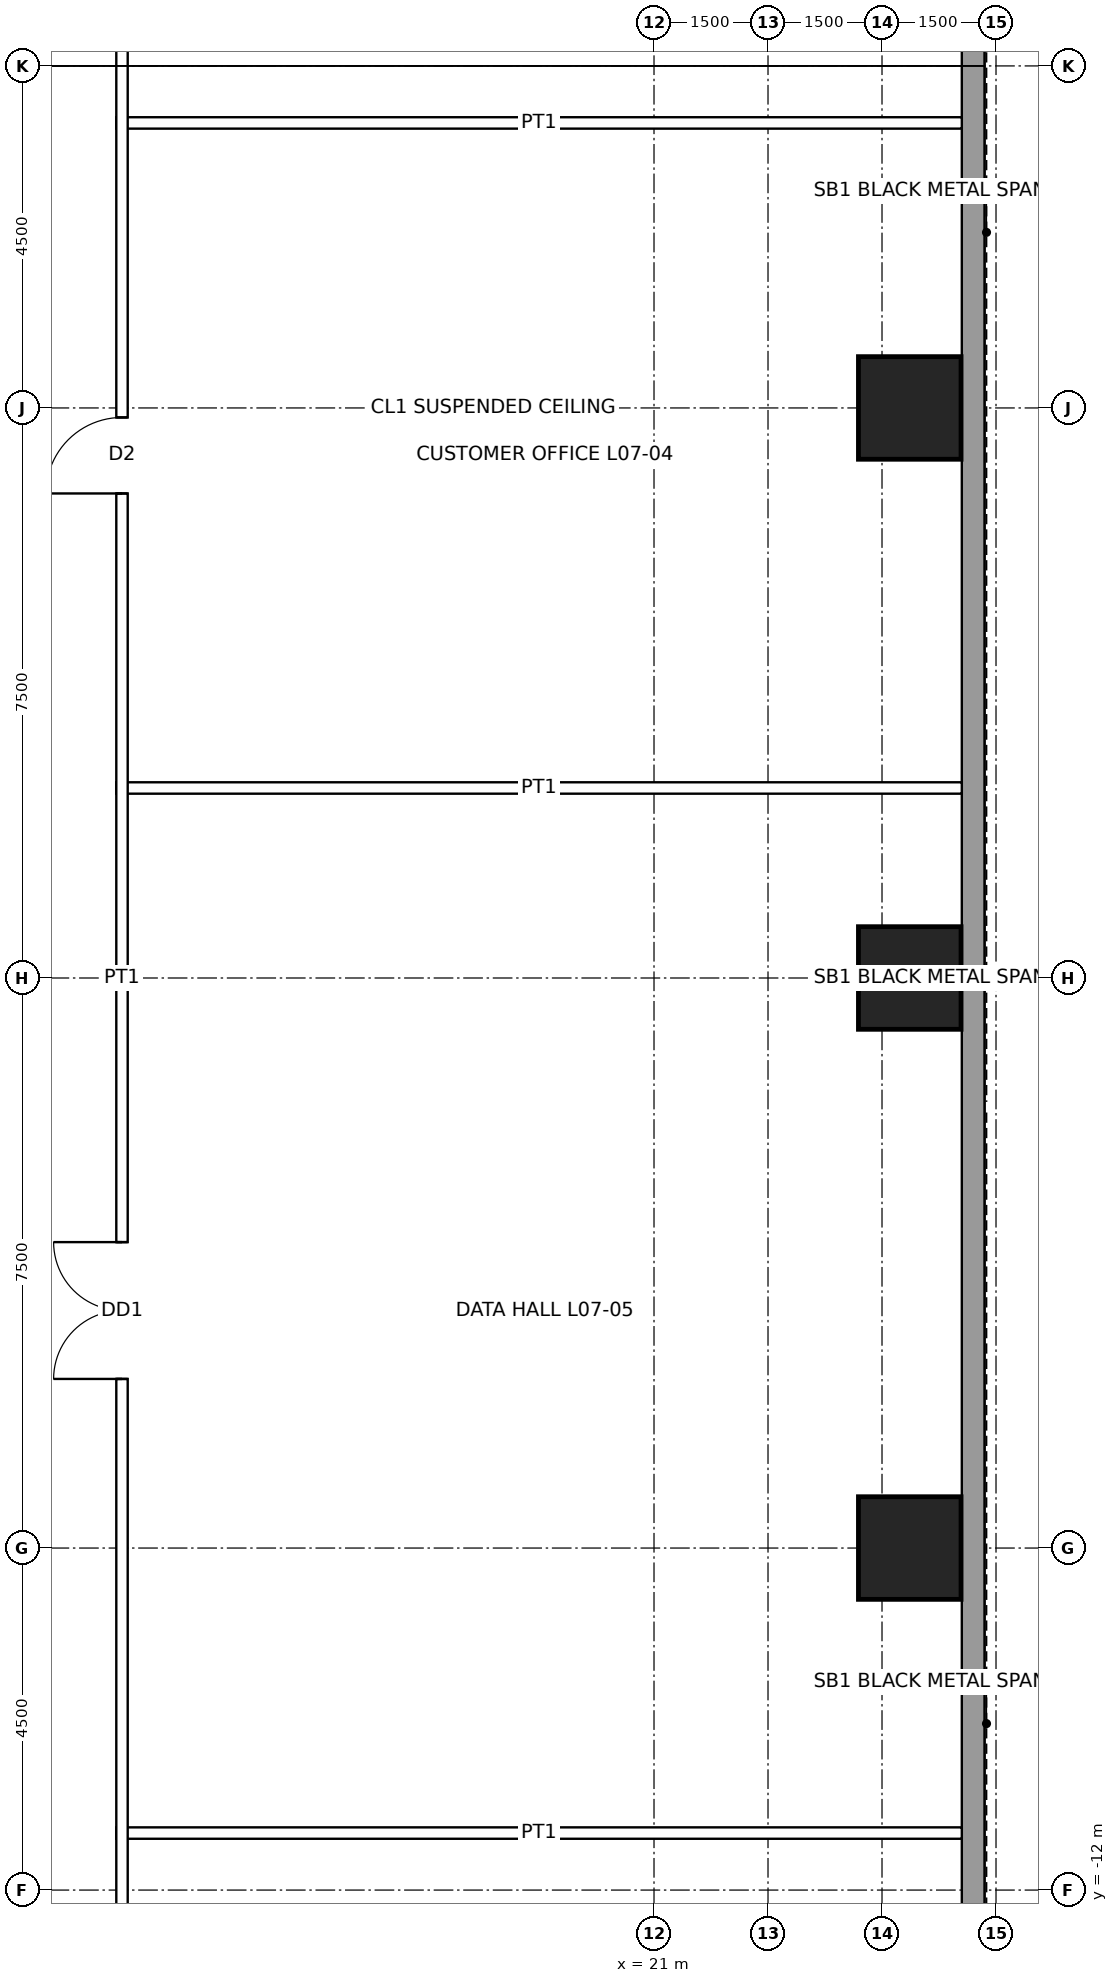
"""IFC4 building model, lengths in metres.
Left out: names, types, materials, properties, quantities, classifications, styles, units other than length and angle.
Written with IfcOpenShell. Run it as: python <this file> out.ifc"""

import sys

from ifc_helpers import new_model, si_unit, direction, frame, frame_2d, origin, origin_2d, place, context, subcontext, project, spatial, rectangle, hollow_rectangle, extrude, element, fill, save


model = new_model("IFC4")
c1 = context("Model", 3, precision=1e-05, world=origin(), true_north=direction((0.0, 1.0)))
c2 = subcontext(c1, "Body", "Model", "MODEL_VIEW")
j1 = project(units=[si_unit("LENGTHUNIT", "METRE"), si_unit("PLANEANGLEUNIT", "RADIAN")], contexts=[c1])
p1 = place(None, origin())
s1 = spatial("IfcSite", under=j1, at=p1, CompositionType="ELEMENT")
p2 = place(p1, origin())
s2 = spatial("IfcBuilding", under=s1, at=p2, CompositionType="ELEMENT")
p3 = place(p2, frame((0.0, 0.0, 38.4)))
s3 = spatial("IfcBuildingStorey", under=s2, at=p3, CompositionType="ELEMENT", Elevation=38.4)
for number, where, z_axis, x_axis in (
    (1, (24.365, 7.5, 0.0), (0.0, 0.0, 1.0), (1.0, 0.0, 0.0)),
    (2, (24.365, 0.0, 0.0), (0.0, 0.0, 1.0), (1.0, 0.0, 0.0)),
    (3, (24.365, -7.5, 0.0), (0.0, 0.0, 1.0), (1.0, 0.0, 0.0)),
):
    element("IfcColumn", number, at=place(p3, frame(where, z_axis=z_axis, x_axis=x_axis)), inside=s3, PredefinedType="COLUMN", context=c2, shape_type="SweptSolid", body=[
        extrude(hollow_rectangle(XDim=1.35, YDim=1.35, WallThickness=0.085, at=origin_2d()), origin(), (0.0, 0.0, 1.0), 5.0),
    ])
p4 = place(p3, frame((25.2, 17.7, 0.0), z_axis=(0.0, 0.0, 1.0), x_axis=(0.0, -1.0, 0.0)))
e4 = element("IfcWall", 4, at=p4, inside=s3, PredefinedType="SOLIDWALL", context=c2, shape_type="SweptSolid", body=[
    extrude(rectangle(XDim=35.4, YDim=0.3, at=frame_2d((17.7, 0.0))), origin(), (0.0, 0.0, 1.0), 4.8),
])
p5 = place(p3, frame((13.925, -11.25, 0.0), z_axis=(0.0, 0.0, 1.0), x_axis=(1.0, 0.0, 0.0)))
e5 = element("IfcWall", 5, at=p5, inside=s3, PredefinedType="PARTITIONING", context=c2, shape_type="SweptSolid", body=[
    extrude(rectangle(XDim=11.125, YDim=0.15, at=frame_2d((5.562, 0.0))), origin(), (0.0, 0.0, 1.0), 3.853),
])
p6 = place(p3, frame((13.925, 2.5, 0.0), z_axis=(0.0, 0.0, 1.0), x_axis=(1.0, 0.0, 0.0)))
e6 = element("IfcWall", 6, at=p6, inside=s3, PredefinedType="PARTITIONING", context=c2, shape_type="SweptSolid", body=[
    extrude(rectangle(XDim=11.125, YDim=0.15, at=frame_2d((5.562, 0.0))), origin(), (0.0, 0.0, 1.0), 4.8),
])
p7 = place(p3, frame((13.925, 11.25, 0.0), z_axis=(0.0, 0.0, 1.0), x_axis=(1.0, 0.0, 0.0)))
e7 = element("IfcWall", 7, at=p7, inside=s3, PredefinedType="PARTITIONING", context=c2, shape_type="SweptSolid", body=[
    extrude(rectangle(XDim=11.125, YDim=0.15, at=frame_2d((5.562, 0.0))), origin(), (0.0, 0.0, 1.0), 3.853),
])
p8 = place(p3, frame((14.0, -14.075, 0.0), z_axis=(0.0, 0.0, 1.0), x_axis=(0.0, 1.0, 0.0)))
e8 = element("IfcWall", 8, at=p8, inside=s3, PredefinedType="PARTITIONING", context=c2, shape_type="SweptSolid", body=[
    extrude(rectangle(XDim=28.15, YDim=0.15, at=frame_2d((14.075, 0.0))), origin(), (0.0, 0.0, 1.0), 4.8),
])
p9 = place(p8, frame((20.45, 0.0, 0.0)))
e9 = element("IfcOpeningElement", 9, at=p9, cuts=e8, PredefinedType="OPENING", context=c2, shape_type="SweptSolid", body=[
    extrude(rectangle(XDim=1.0, YDim=2.1, at=frame_2d((0.5, 1.05))), frame((0.0, 0.085, 0.0), z_axis=(0.0, -1.0, 0.0), x_axis=(1.0, 0.0, 0.0)), (0.0, 0.0, 1.0), 0.17),
])
p10 = place(p8, frame((8.8, 0.0, 0.0)))
e10 = element("IfcOpeningElement", 10, at=p10, cuts=e8, PredefinedType="OPENING", context=c2, shape_type="SweptSolid", body=[
    extrude(rectangle(XDim=1.8, YDim=2.4, at=frame_2d((0.9, 1.2))), frame((0.0, 0.085, 0.0), z_axis=(0.0, -1.0, 0.0), x_axis=(1.0, 0.0, 0.0)), (0.0, 0.0, 1.0), 0.17),
])
p11 = place(p9, origin())
e11 = element("IfcDoor", 11, at=p11, inside=s3, OperationType="SINGLE_SWING_LEFT", PredefinedType="DOOR", context=c2, shape_type="SweptSolid", body=[
    extrude(rectangle(XDim=1.0, YDim=2.1, at=frame_2d((0.5, 1.05))), frame((0.0, 0.025, 0.0), z_axis=(0.0, -1.0, 0.0), x_axis=(1.0, 0.0, 0.0)), (0.0, 0.0, 1.0), 0.05),
])
fill(e9, e11)
p12 = place(p10, origin())
e12 = element("IfcDoor", 12, at=p12, inside=s3, OperationType="DOUBLE_DOOR_SINGLE_SWING", PredefinedType="DOOR", context=c2, shape_type="SweptSolid", body=[
    extrude(rectangle(XDim=1.8, YDim=2.4, at=frame_2d((0.9, 1.2))), frame((0.0, 0.025, 0.0), z_axis=(0.0, -1.0, 0.0), x_axis=(1.0, 0.0, 0.0)), (0.0, 0.0, 1.0), 0.05),
])
fill(e10, e12)
save(model, sys.argv[1])
